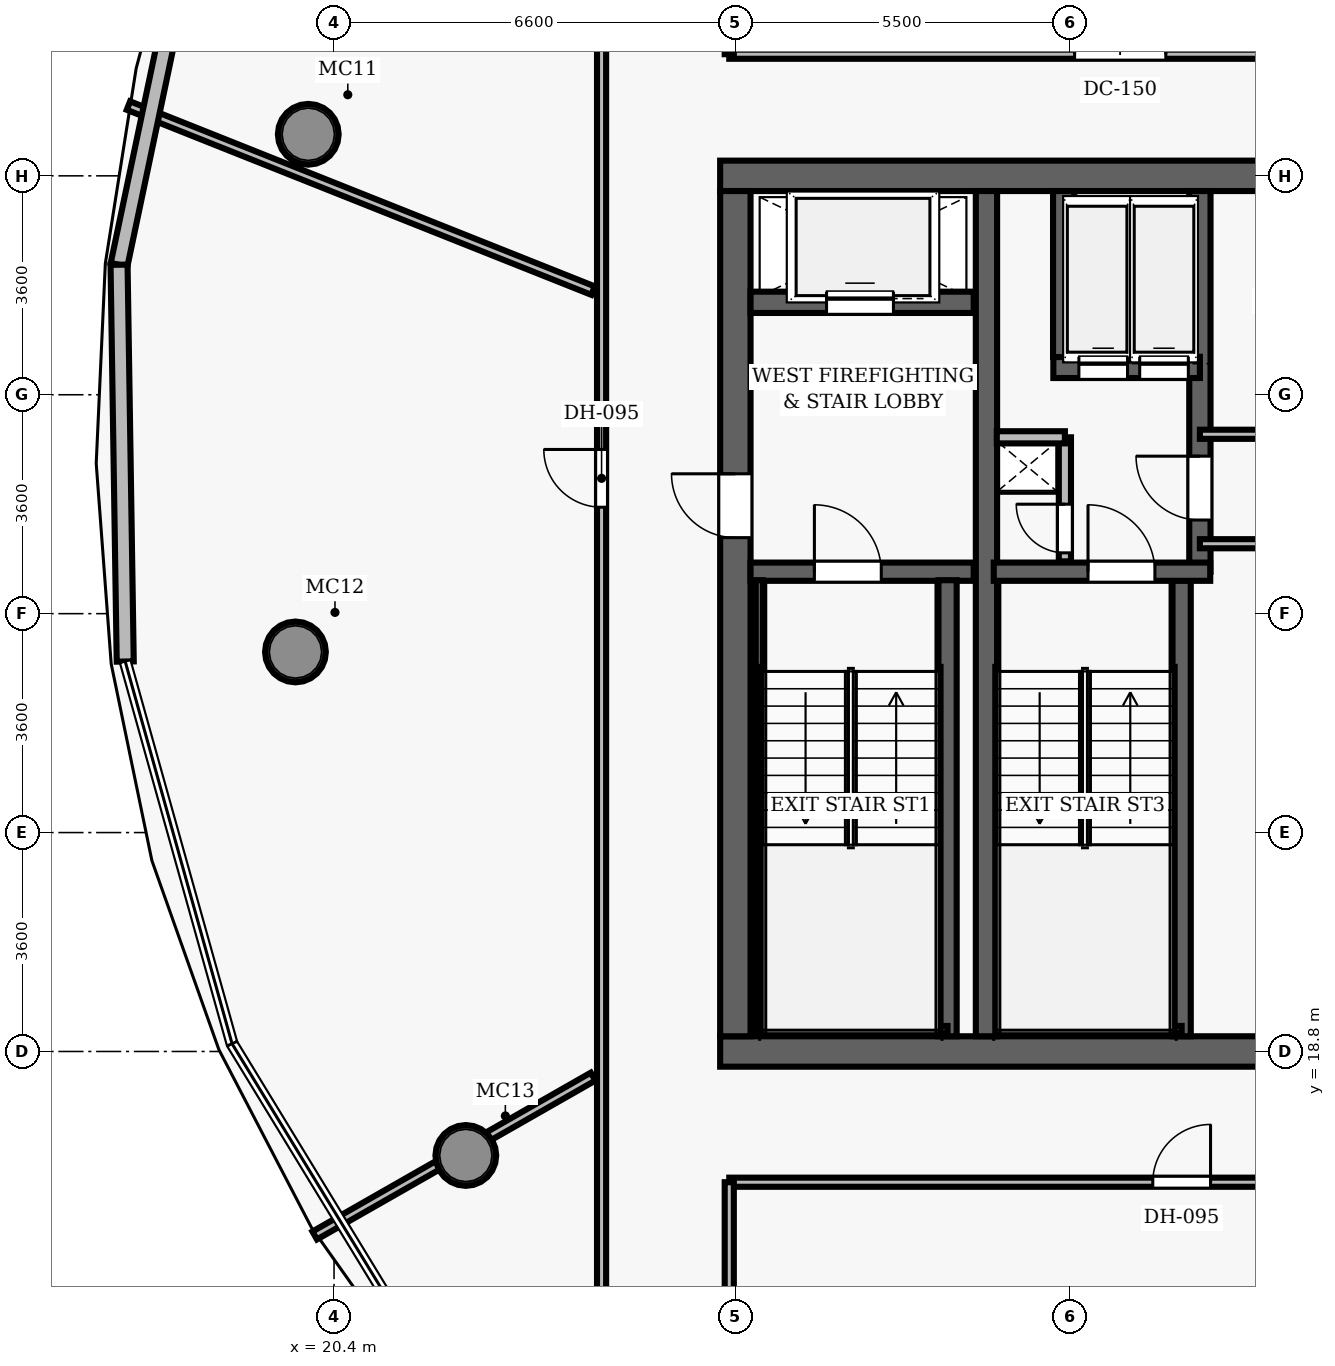
"""IFC4 building model, lengths in metres.
Left out: names, types, materials, properties, quantities, classifications, styles, units other than length and angle.
Written with IfcOpenShell. Run it as: python <this file> out.ifc"""

import sys

from ifc_helpers import new_model, si_unit, direction, frame, frame_2d, origin, origin_2d, place, context, subcontext, project, spatial, rectangle, hollow_circle, extrude, element, fill, save


model = new_model("IFC4")
c1 = context("Model", 3, precision=1e-05, world=origin(), true_north=direction((0.0, 1.0)))
c2 = subcontext(c1, "Body", "Model", "MODEL_VIEW")
j1 = project(units=[si_unit("LENGTHUNIT", "METRE"), si_unit("PLANEANGLEUNIT", "RADIAN")], contexts=[c1])
p1 = place(None, origin())
s1 = spatial("IfcSite", under=j1, at=p1, CompositionType="ELEMENT")
p2 = place(p1, origin())
s2 = spatial("IfcBuilding", under=s1, at=p2, CompositionType="ELEMENT")
p3 = place(p2, frame((0.0, 0.0, 299.8)))
s3 = spatial("IfcBuildingStorey", under=s2, at=p3, CompositionType="ELEMENT", Elevation=299.8)
p4 = place(p3, frame((26.75, 18.8, 0.0), z_axis=(0.0, 0.0, 1.0), x_axis=(1.0, 0.0, 0.0)))
e1 = element("IfcWall", 1, at=p4, inside=s3, PredefinedType="SHEAR", context=c2, shape_type="SweptSolid", body=[
    extrude(rectangle(XDim=22.5, YDim=0.5, at=frame_2d((11.25, 0.0))), origin(), (0.0, 0.0, 1.0), 3.85),
])
p5 = place(p4, frame((14.47, 0.0, 0.0)))
e2 = element("IfcOpeningElement", 2, at=p5, cuts=e1, PredefinedType="OPENING", context=c2, shape_type="SweptSolid", body=[
    extrude(rectangle(XDim=1.05, YDim=2.15, at=frame_2d((0.525, 1.075))), frame((0.0, 0.26, 0.0), z_axis=(0.0, -1.0, 0.0), x_axis=(1.0, 0.0, 0.0)), (0.0, 0.0, 1.0), 0.52),
])
p6 = place(p3, frame((26.75, 33.2, 0.0), z_axis=(0.0, 0.0, 1.0), x_axis=(1.0, 0.0, 0.0)))
e3 = element("IfcWall", 3, at=p6, inside=s3, PredefinedType="SHEAR", context=c2, shape_type="SweptSolid", body=[
    extrude(rectangle(XDim=22.5, YDim=0.5, at=frame_2d((11.25, 0.0))), origin(), (0.0, 0.0, 1.0), 3.85),
])
p7 = place(p3, frame((27.0, 19.05, 0.0), z_axis=(0.0, 0.0, 1.0), x_axis=(0.0, 1.0, 0.0)))
e4 = element("IfcWall", 4, at=p7, inside=s3, PredefinedType="SHEAR", context=c2, shape_type="SweptSolid", body=[
    extrude(rectangle(XDim=13.9, YDim=0.5, at=frame_2d((6.95, 0.0))), origin(), (0.0, 0.0, 1.0), 3.85),
])
p8 = place(p7, frame((8.2, 0.0, 0.0)))
e5 = element("IfcOpeningElement", 5, at=p8, cuts=e4, PredefinedType="OPENING", context=c2, shape_type="SweptSolid", body=[
    extrude(rectangle(XDim=1.05, YDim=2.15, at=frame_2d((0.525, 1.075))), frame((0.0, 0.26, 0.0), z_axis=(0.0, -1.0, 0.0), x_axis=(1.0, 0.0, 0.0)), (0.0, 0.0, 1.0), 0.52),
])
p9 = place(p3, frame((31.13, 19.05, 0.0), z_axis=(0.0, 0.0, 1.0), x_axis=(0.0, 1.0, 0.0)))
e6 = element("IfcWall", 6, at=p9, inside=s3, PredefinedType="SHEAR", context=c2, shape_type="SweptSolid", body=[
    extrude(rectangle(XDim=13.9, YDim=0.35, at=frame_2d((6.95, 0.0))), origin(), (0.0, 0.0, 1.0), 3.85),
])
for number, where, z_axis, x_axis in (
    (7, (19.976, 33.884, 0.0), (0.0, 0.0, 1.0), (1.0, 0.0, 0.0)),
    (8, (19.765, 25.371, 0.0), (0.0, 0.0, 1.0), (1.0, 0.0, 0.0)),
    (9, (22.567, 17.09, 0.0), (0.0, 0.0, 1.0), (1.0, 0.0, 0.0)),
):
    element("IfcColumn", number, at=place(p3, frame(where, z_axis=z_axis, x_axis=x_axis)), inside=s3, PredefinedType="COLUMN", context=c2, shape_type="SweptSolid", body=[
        extrude(hollow_circle(Radius=0.5, WallThickness=0.045, at=origin_2d()), origin(), (0.0, 0.0, 1.0), 3.85),
    ])
p10 = place(p3, frame((27.25, 26.69, 0.0), z_axis=(0.0, 0.0, 1.0), x_axis=(1.0, 0.0, 0.0)))
e10 = element("IfcWall", 10, at=p10, inside=s3, PredefinedType="SHEAR", context=c2, shape_type="SweptSolid", body=[
    extrude(rectangle(XDim=3.67, YDim=0.3, at=frame_2d((1.835, 0.0))), origin(), (0.0, 0.0, 1.0), 3.85),
])
p11 = place(p10, frame((1.05, 0.0, 0.0)))
e11 = element("IfcOpeningElement", 11, at=p11, cuts=e10, PredefinedType="OPENING", context=c2, shape_type="SweptSolid", body=[
    extrude(rectangle(XDim=1.1, YDim=2.15, at=frame_2d((0.55, 1.075))), frame((0.0, 0.16, 0.0), z_axis=(0.0, -1.0, 0.0), x_axis=(1.0, 0.0, 0.0)), (0.0, 0.0, 1.0), 0.32),
])
p12 = place(p3, frame((30.49, 19.05, 0.0), z_axis=(0.0, 0.0, 1.0), x_axis=(0.0, 1.0, 0.0)))
e12 = element("IfcWall", 12, at=p12, inside=s3, PredefinedType="SHEAR", context=c2, shape_type="SweptSolid", body=[
    extrude(rectangle(XDim=7.5, YDim=0.3, at=frame_2d((3.75, 0.0))), origin(), (0.0, 0.0, 1.0), 3.85),
])
p13 = place(p3, frame((27.395, 19.1, 0.0), z_axis=(0.0, 0.0, 1.0), x_axis=(0.0, 1.0, 0.0)))
e13 = element("IfcWall", 13, at=p13, inside=s3, PredefinedType="SHEAR", context=c2, shape_type="SweptSolid", body=[
    extrude(rectangle(XDim=7.45, YDim=0.12, at=frame_2d((3.725, 0.0))), origin(), (0.0, 0.0, 1.0), 3.85),
])
p14 = place(p3, frame((27.395, 19.16, 0.0), z_axis=(0.0, 0.0, 1.0), x_axis=(1.0, 0.0, 0.0)))
e14 = element("IfcWall", 14, at=p14, inside=s3, PredefinedType="SHEAR", context=c2, shape_type="SweptSolid", body=[
    extrude(rectangle(XDim=3.095, YDim=0.12, at=frame_2d((1.547, 0.0))), origin(), (0.0, 0.0, 1.0), 3.85),
])
p15 = place(p3, frame((27.25, 31.12, 0.0), z_axis=(0.0, 0.0, 1.0), x_axis=(1.0, 0.0, 0.0)))
e15 = element("IfcWall", 15, at=p15, inside=s3, PredefinedType="SHEAR", context=c2, shape_type="SweptSolid", body=[
    extrude(rectangle(XDim=3.67, YDim=0.35, at=frame_2d((1.835, 0.0))), origin(), (0.0, 0.0, 1.0), 3.04),
])
p16 = place(p15, frame((1.25, 0.0, 0.0)))
e16 = element("IfcOpeningElement", 16, at=p16, cuts=e15, PredefinedType="OPENING", context=c2, shape_type="SweptSolid", body=[
    extrude(rectangle(XDim=1.1, YDim=2.15, at=frame_2d((0.55, 1.075))), frame((0.0, 0.185, 0.0), z_axis=(0.0, -1.0, 0.0), x_axis=(1.0, 0.0, 0.0)), (0.0, 0.0, 1.0), 0.37),
])
p17 = place(p3, frame((34.34, 19.05, 0.0), z_axis=(0.0, 0.0, 1.0), x_axis=(0.0, 1.0, 0.0)))
e17 = element("IfcWall", 17, at=p17, inside=s3, PredefinedType="SHEAR", context=c2, shape_type="SweptSolid", body=[
    extrude(rectangle(XDim=7.5, YDim=0.3, at=frame_2d((3.75, 0.0))), origin(), (0.0, 0.0, 1.0), 3.85),
])
p18 = place(p3, frame((34.64, 26.69, 0.0), z_axis=(0.0, 0.0, 1.0), x_axis=(0.0, 1.0, 0.0)))
e18 = element("IfcWall", 18, at=p18, inside=s3, PredefinedType="SHEAR", context=c2, shape_type="SweptSolid", body=[
    extrude(rectangle(XDim=6.26, YDim=0.35, at=frame_2d((3.13, 0.0))), origin(), (0.0, 0.0, 1.0), 3.85),
])
p19 = place(p18, frame((0.85, 0.0, 0.0)))
e19 = element("IfcOpeningElement", 19, at=p19, cuts=e18, PredefinedType="OPENING", context=c2, shape_type="SweptSolid", body=[
    extrude(rectangle(XDim=1.05, YDim=2.15, at=frame_2d((0.525, 1.075))), frame((0.0, 0.185, 0.0), z_axis=(0.0, -1.0, 0.0), x_axis=(1.0, 0.0, 0.0)), (0.0, 0.0, 1.0), 0.37),
])
p20 = place(p3, frame((31.25, 26.69, 0.0), z_axis=(0.0, 0.0, 1.0), x_axis=(1.0, 0.0, 0.0)))
e20 = element("IfcWall", 20, at=p20, inside=s3, PredefinedType="SHEAR", context=c2, shape_type="SweptSolid", body=[
    extrude(rectangle(XDim=3.56, YDim=0.3, at=frame_2d((1.78, 0.0))), origin(), (0.0, 0.0, 1.0), 3.85),
])
p21 = place(p20, frame((1.55, 0.0, 0.0)))
e21 = element("IfcOpeningElement", 21, at=p21, cuts=e20, PredefinedType="OPENING", context=c2, shape_type="SweptSolid", body=[
    extrude(rectangle(XDim=1.1, YDim=2.15, at=frame_2d((0.55, 1.075))), frame((0.0, 0.16, 0.0), z_axis=(0.0, -1.0, 0.0), x_axis=(1.0, 0.0, 0.0)), (0.0, 0.0, 1.0), 0.32),
])
p22 = place(p3, frame((31.3, 19.16, 0.0), z_axis=(0.0, 0.0, 1.0), x_axis=(1.0, 0.0, 0.0)))
e22 = element("IfcWall", 22, at=p22, inside=s3, PredefinedType="SHEAR", context=c2, shape_type="SweptSolid", body=[
    extrude(rectangle(XDim=3.04, YDim=0.12, at=frame_2d((1.52, 0.0))), origin(), (0.0, 0.0, 1.0), 3.85),
])
p23 = place(p3, frame((32.23, 30.05, 0.0), z_axis=(0.0, 0.0, 1.0), x_axis=(1.0, 0.0, 0.0)))
e23 = element("IfcWall", 23, at=p23, inside=s3, PredefinedType="SHEAR", context=c2, shape_type="SweptSolid", body=[
    extrude(rectangle(XDim=2.41, YDim=0.35, at=frame_2d((1.205, 0.0))), origin(), (0.0, 0.0, 1.0), 3.04),
])
p24 = place(p23, frame((0.42, 0.0, 0.0)))
e24 = element("IfcOpeningElement", 24, at=p24, cuts=e23, PredefinedType="OPENING", context=c2, shape_type="SweptSolid", body=[
    extrude(rectangle(XDim=0.8, YDim=2.15, at=frame_2d((0.4, 1.075))), frame((0.0, 0.185, 0.0), z_axis=(0.0, -1.0, 0.0), x_axis=(1.0, 0.0, 0.0)), (0.0, 0.0, 1.0), 0.37),
])
p25 = place(p23, frame((1.42, 0.0, 0.0)))
e25 = element("IfcOpeningElement", 25, at=p25, cuts=e23, PredefinedType="OPENING", context=c2, shape_type="SweptSolid", body=[
    extrude(rectangle(XDim=0.8, YDim=2.15, at=frame_2d((0.4, 1.075))), frame((0.0, 0.185, 0.0), z_axis=(0.0, -1.0, 0.0), x_axis=(1.0, 0.0, 0.0)), (0.0, 0.0, 1.0), 0.37),
])
p26 = place(p3, frame((32.4, 30.22, 0.0), z_axis=(0.0, 0.0, 1.0), x_axis=(0.0, 1.0, 0.0)))
e26 = element("IfcWall", 26, at=p26, inside=s3, PredefinedType="SHEAR", context=c2, shape_type="SweptSolid", body=[
    extrude(rectangle(XDim=2.73, YDim=0.35, at=frame_2d((1.365, 0.0))), origin(), (0.0, 0.0, 1.0), 3.04),
])
p27 = place(p3, frame((32.42, 26.86, 0.0), z_axis=(0.0, 0.0, 1.0), x_axis=(0.0, 1.0, 0.0)))
e27 = element("IfcWall", 27, at=p27, inside=s3, PredefinedType="PARTITIONING", context=c2, shape_type="SweptSolid", body=[
    extrude(rectangle(XDim=2.04, YDim=0.2, at=frame_2d((1.02, 0.0))), origin(), (0.0, 0.0, 1.0), 3.04),
])
p28 = place(p27, frame((0.14, 0.0, 0.0)))
e28 = element("IfcOpeningElement", 28, at=p28, cuts=e27, PredefinedType="OPENING", context=c2, shape_type="SweptSolid", body=[
    extrude(rectangle(XDim=0.8, YDim=2.05, at=frame_2d((0.4, 1.025))), frame((0.0, 0.11, 0.0), z_axis=(0.0, -1.0, 0.0), x_axis=(1.0, 0.0, 0.0)), (0.0, 0.0, 1.0), 0.22),
])
p29 = place(p3, frame((31.3, 28.9, 0.0), z_axis=(0.0, 0.0, 1.0), x_axis=(1.0, 0.0, 0.0)))
e29 = element("IfcWall", 29, at=p29, inside=s3, PredefinedType="PARTITIONING", context=c2, shape_type="SweptSolid", body=[
    extrude(rectangle(XDim=1.12, YDim=0.2, at=frame_2d((0.56, 0.0))), origin(), (0.0, 0.0, 1.0), 3.04),
])
for number, where, z_axis, x_axis in (
    (30, (34.64, 27.15, 0.0), (0.0, 0.0, 1.0), (1.0, 0.0, 0.0)),
    (31, (34.64, 28.95, 0.0), (0.0, 0.0, 1.0), (1.0, 0.0, 0.0)),
):
    element("IfcWall", number, at=place(p3, frame(where, z_axis=z_axis, x_axis=x_axis)), inside=s3, PredefinedType="PARTITIONING", context=c2, shape_type="SweptSolid", body=[
        extrude(rectangle(XDim=6.36, YDim=0.15, at=frame_2d((3.18, 0.0))), origin(), (0.0, 0.0, 1.0), 3.04),
    ])
p30 = place(p3, frame((26.9, 16.65, 0.0), z_axis=(0.0, 0.0, 1.0), x_axis=(1.0, 0.0, 0.0)))
e32 = element("IfcWall", 32, at=p30, inside=s3, PredefinedType="PARTITIONING", context=c2, shape_type="SweptSolid", body=[
    extrude(rectangle(XDim=22.2, YDim=0.15, at=frame_2d((11.1, 0.0))), origin(), (0.0, 0.0, 1.0), 3.04),
])
p31 = place(p30, frame((6.965, 0.0, 0.0)))
e33 = element("IfcOpeningElement", 33, at=p31, cuts=e32, PredefinedType="OPENING", context=c2, shape_type="SweptSolid", body=[
    extrude(rectangle(XDim=0.95, YDim=2.15, at=frame_2d((0.475, 1.075))), frame((0.0, 0.085, 0.0), z_axis=(0.0, -1.0, 0.0), x_axis=(1.0, 0.0, 0.0)), (0.0, 0.0, 1.0), 0.17),
])
p32 = place(p30, frame((14.251, 0.0, 0.0)))
e34 = element("IfcOpeningElement", 34, at=p32, cuts=e32, PredefinedType="OPENING", context=c2, shape_type="SweptSolid", body=[
    extrude(rectangle(XDim=0.95, YDim=2.15, at=frame_2d((0.475, 1.075))), frame((0.0, 0.085, 0.0), z_axis=(0.0, -1.0, 0.0), x_axis=(1.0, 0.0, 0.0)), (0.0, 0.0, 1.0), 0.17),
])
p33 = place(p3, frame((26.9, 35.2, 0.0), z_axis=(0.0, 0.0, 1.0), x_axis=(1.0, 0.0, 0.0)))
e35 = element("IfcWall", 35, at=p33, inside=s3, PredefinedType="PARTITIONING", context=c2, shape_type="SweptSolid", body=[
    extrude(rectangle(XDim=10.05, YDim=0.15, at=frame_2d((5.025, 0.0))), origin(), (0.0, 0.0, 1.0), 3.04),
])
p34 = place(p33, frame((5.679, 0.0, 0.0)))
e36 = element("IfcOpeningElement", 36, at=p34, cuts=e35, PredefinedType="OPENING", context=c2, shape_type="SweptSolid", body=[
    extrude(rectangle(XDim=1.5, YDim=2.2, at=frame_2d((0.75, 1.1))), frame((0.0, 0.085, 0.0), z_axis=(0.0, -1.0, 0.0), x_axis=(1.0, 0.0, 0.0)), (0.0, 0.0, 1.0), 0.17),
])
p35 = place(p3, frame((24.8, 11.186, 0.0), z_axis=(0.0, 0.0, 1.0), x_axis=(0.0, 1.0, 0.0)))
e37 = element("IfcWall", 37, at=p35, inside=s3, PredefinedType="PARTITIONING", context=c2, shape_type="SweptSolid", body=[
    extrude(rectangle(XDim=30.214, YDim=0.15, at=frame_2d((15.107, 0.0))), origin(), (0.0, 0.0, 1.0), 3.04),
])
p36 = place(p35, frame((16.564, 0.0, 0.0)))
e38 = element("IfcOpeningElement", 38, at=p36, cuts=e37, PredefinedType="OPENING", context=c2, shape_type="SweptSolid", body=[
    extrude(rectangle(XDim=0.95, YDim=2.15, at=frame_2d((0.475, 1.075))), frame((0.0, 0.085, 0.0), z_axis=(0.0, -1.0, 0.0), x_axis=(1.0, 0.0, 0.0)), (0.0, 0.0, 1.0), 0.17),
])
p37 = place(p3, frame((26.9, 11.186, 0.0), z_axis=(0.0, 0.0, 1.0), x_axis=(0.0, 1.0, 0.0)))
e39 = element("IfcWall", 39, at=p37, inside=s3, PredefinedType="PARTITIONING", context=c2, shape_type="SweptSolid", body=[
    extrude(rectangle(XDim=5.464, YDim=0.15, at=frame_2d((2.732, 0.0))), origin(), (0.0, 0.0, 1.0), 3.04),
])
p38 = place(p3, frame((26.9, 35.2, 0.0), z_axis=(0.0, 0.0, 1.0), x_axis=(0.0, 1.0, 0.0)))
e40 = element("IfcWall", 40, at=p38, inside=s3, PredefinedType="PARTITIONING", context=c2, shape_type="SweptSolid", body=[
    extrude(rectangle(XDim=6.2, YDim=0.15, at=frame_2d((3.1, 0.0))), origin(), (0.0, 0.0, 1.0), 3.04),
])
p39 = place(p3, frame((24.66, 31.312, 0.0), z_axis=(0.0, 0.0, 1.0), x_axis=(-0.929038553927, 0.369982925709, 0.0)))
e41 = element("IfcWall", 41, at=p39, inside=s3, PredefinedType="PARTITIONING", context=c2, shape_type="SweptSolid", body=[
    extrude(rectangle(XDim=8.225, YDim=0.15, at=frame_2d((4.113, 0.0))), origin(), (0.0, 0.0, 1.0), 3.04),
])
p40 = place(p3, frame((24.66, 18.387, 0.0), z_axis=(0.0, 0.0, 1.0), x_axis=(-0.868499553792, -0.495689948519, 0.0)))
e42 = element("IfcWall", 42, at=p40, inside=s3, PredefinedType="PARTITIONING", context=c2, shape_type="SweptSolid", body=[
    extrude(rectangle(XDim=5.271, YDim=0.15, at=frame_2d((2.635, 0.0))), origin(), (0.0, 0.0, 1.0), 3.04),
])
p41 = place(p3, frame((36.521, 16.51, 0.0), z_axis=(0.0, 0.0, 1.0), x_axis=(-0.153984417471, -0.988073276218, 0.0)))
e43 = element("IfcWall", 43, at=p41, inside=s3, PredefinedType="PARTITIONING", context=c2, shape_type="SweptSolid", body=[
    extrude(rectangle(XDim=12.335, YDim=0.15, at=frame_2d((6.167, 0.0))), origin(), (0.0, 0.0, 1.0), 3.04),
])
p42 = place(p3, frame((16.864, 31.738, 0.0), z_axis=(0.0, 0.0, 1.0), x_axis=(0.205843717041, 0.97858487836, 0.0)))
e44 = element("IfcWall", 44, at=p42, inside=s3, PredefinedType="SOLIDWALL", context=c2, shape_type="SweptSolid", body=[
    extrude(rectangle(XDim=6.345, YDim=0.28, at=frame_2d((3.173, 0.0))), origin(), (0.0, 0.0, 1.0), 3.625),
])
p43 = place(p3, frame((16.966, 25.213, 0.0), z_axis=(0.0, 0.0, 1.0), x_axis=(-0.015562317507, 0.999878899804, 0.0)))
e45 = element("IfcWall", 45, at=p43, inside=s3, PredefinedType="SOLIDWALL", context=c2, shape_type="SweptSolid", body=[
    extrude(rectangle(XDim=6.526, YDim=0.28, at=frame_2d((3.263, 0.0))), origin(), (0.0, 0.0, 1.0), 3.625),
])
p44 = place(p11, origin())
e46 = element("IfcDoor", 46, at=p44, inside=s3, OperationType="SINGLE_SWING_LEFT", PredefinedType="DOOR", context=c2, shape_type="SweptSolid", body=[
    extrude(rectangle(XDim=1.1, YDim=2.15, at=frame_2d((0.55, 1.075))), frame((0.0, 0.025, 0.0), z_axis=(0.0, -1.0, 0.0), x_axis=(1.0, 0.0, 0.0)), (0.0, 0.0, 1.0), 0.05),
])
fill(e11, e46)
p45 = place(p8, origin())
e47 = element("IfcDoor", 47, at=p45, inside=s3, OperationType="SINGLE_SWING_RIGHT", PredefinedType="DOOR", context=c2, shape_type="SweptSolid", body=[
    extrude(rectangle(XDim=1.05, YDim=2.15, at=frame_2d((0.525, 1.075))), frame((0.0, 0.025, 0.0), z_axis=(0.0, -1.0, 0.0), x_axis=(1.0, 0.0, 0.0)), (0.0, 0.0, 1.0), 0.05),
])
fill(e5, e47)
p46 = place(p21, origin())
e48 = element("IfcDoor", 48, at=p46, inside=s3, OperationType="SINGLE_SWING_LEFT", PredefinedType="DOOR", context=c2, shape_type="SweptSolid", body=[
    extrude(rectangle(XDim=1.1, YDim=2.15, at=frame_2d((0.55, 1.075))), frame((0.0, 0.025, 0.0), z_axis=(0.0, -1.0, 0.0), x_axis=(1.0, 0.0, 0.0)), (0.0, 0.0, 1.0), 0.05),
])
fill(e21, e48)
p47 = place(p28, origin())
e49 = element("IfcDoor", 49, at=p47, inside=s3, OperationType="SINGLE_SWING_RIGHT", PredefinedType="DOOR", context=c2, shape_type="SweptSolid", body=[
    extrude(rectangle(XDim=0.8, YDim=2.05, at=frame_2d((0.4, 1.025))), frame((0.0, 0.025, 0.0), z_axis=(0.0, -1.0, 0.0), x_axis=(1.0, 0.0, 0.0)), (0.0, 0.0, 1.0), 0.05),
])
fill(e28, e49)
p48 = place(p19, origin())
e50 = element("IfcDoor", 50, at=p48, inside=s3, OperationType="SINGLE_SWING_RIGHT", PredefinedType="DOOR", context=c2, shape_type="SweptSolid", body=[
    extrude(rectangle(XDim=1.05, YDim=2.15, at=frame_2d((0.525, 1.075))), frame((0.0, 0.025, 0.0), z_axis=(0.0, -1.0, 0.0), x_axis=(1.0, 0.0, 0.0)), (0.0, 0.0, 1.0), 0.05),
])
fill(e19, e50)
p49 = place(p34, origin())
e51 = element("IfcDoor", 51, at=p49, inside=s3, OperationType="DOUBLE_DOOR_SINGLE_SWING", PredefinedType="DOOR", context=c2, shape_type="SweptSolid", body=[
    extrude(rectangle(XDim=1.5, YDim=2.2, at=frame_2d((0.75, 1.1))), frame((0.0, 0.025, 0.0), z_axis=(0.0, -1.0, 0.0), x_axis=(1.0, 0.0, 0.0)), (0.0, 0.0, 1.0), 0.05),
])
fill(e36, e51)
p50 = place(p36, origin())
e52 = element("IfcDoor", 52, at=p50, inside=s3, OperationType="SINGLE_SWING_RIGHT", PredefinedType="DOOR", context=c2, shape_type="SweptSolid", body=[
    extrude(rectangle(XDim=0.95, YDim=2.15, at=frame_2d((0.475, 1.075))), frame((0.0, 0.025, 0.0), z_axis=(0.0, -1.0, 0.0), x_axis=(1.0, 0.0, 0.0)), (0.0, 0.0, 1.0), 0.05),
])
fill(e38, e52)
p51 = place(p31, origin())
e53 = element("IfcDoor", 53, at=p51, inside=s3, OperationType="SINGLE_SWING_RIGHT", PredefinedType="DOOR", context=c2, shape_type="SweptSolid", body=[
    extrude(rectangle(XDim=0.95, YDim=2.15, at=frame_2d((0.475, 1.075))), frame((0.0, 0.025, 0.0), z_axis=(0.0, -1.0, 0.0), x_axis=(1.0, 0.0, 0.0)), (0.0, 0.0, 1.0), 0.05),
])
fill(e33, e53)
p52 = place(p16, origin())
e54 = element("IfcDoor", 54, at=p52, inside=s3, OperationType="SLIDING_TO_LEFT", PredefinedType="DOOR", context=c2, shape_type="SweptSolid", body=[
    extrude(rectangle(XDim=1.1, YDim=2.15, at=frame_2d((0.55, 1.075))), frame((0.0, 0.025, 0.0), z_axis=(0.0, -1.0, 0.0), x_axis=(1.0, 0.0, 0.0)), (0.0, 0.0, 1.0), 0.05),
])
fill(e16, e54)
p53 = place(p24, origin())
e55 = element("IfcDoor", 55, at=p53, inside=s3, OperationType="SLIDING_TO_LEFT", PredefinedType="DOOR", context=c2, shape_type="SweptSolid", body=[
    extrude(rectangle(XDim=0.8, YDim=2.15, at=frame_2d((0.4, 1.075))), frame((0.0, 0.025, 0.0), z_axis=(0.0, -1.0, 0.0), x_axis=(1.0, 0.0, 0.0)), (0.0, 0.0, 1.0), 0.05),
])
fill(e24, e55)
p54 = place(p25, origin())
e56 = element("IfcDoor", 56, at=p54, inside=s3, OperationType="SLIDING_TO_LEFT", PredefinedType="DOOR", context=c2, shape_type="SweptSolid", body=[
    extrude(rectangle(XDim=0.8, YDim=2.15, at=frame_2d((0.4, 1.075))), frame((0.0, 0.025, 0.0), z_axis=(0.0, -1.0, 0.0), x_axis=(1.0, 0.0, 0.0)), (0.0, 0.0, 1.0), 0.05),
])
fill(e25, e56)
save(model, sys.argv[1])
